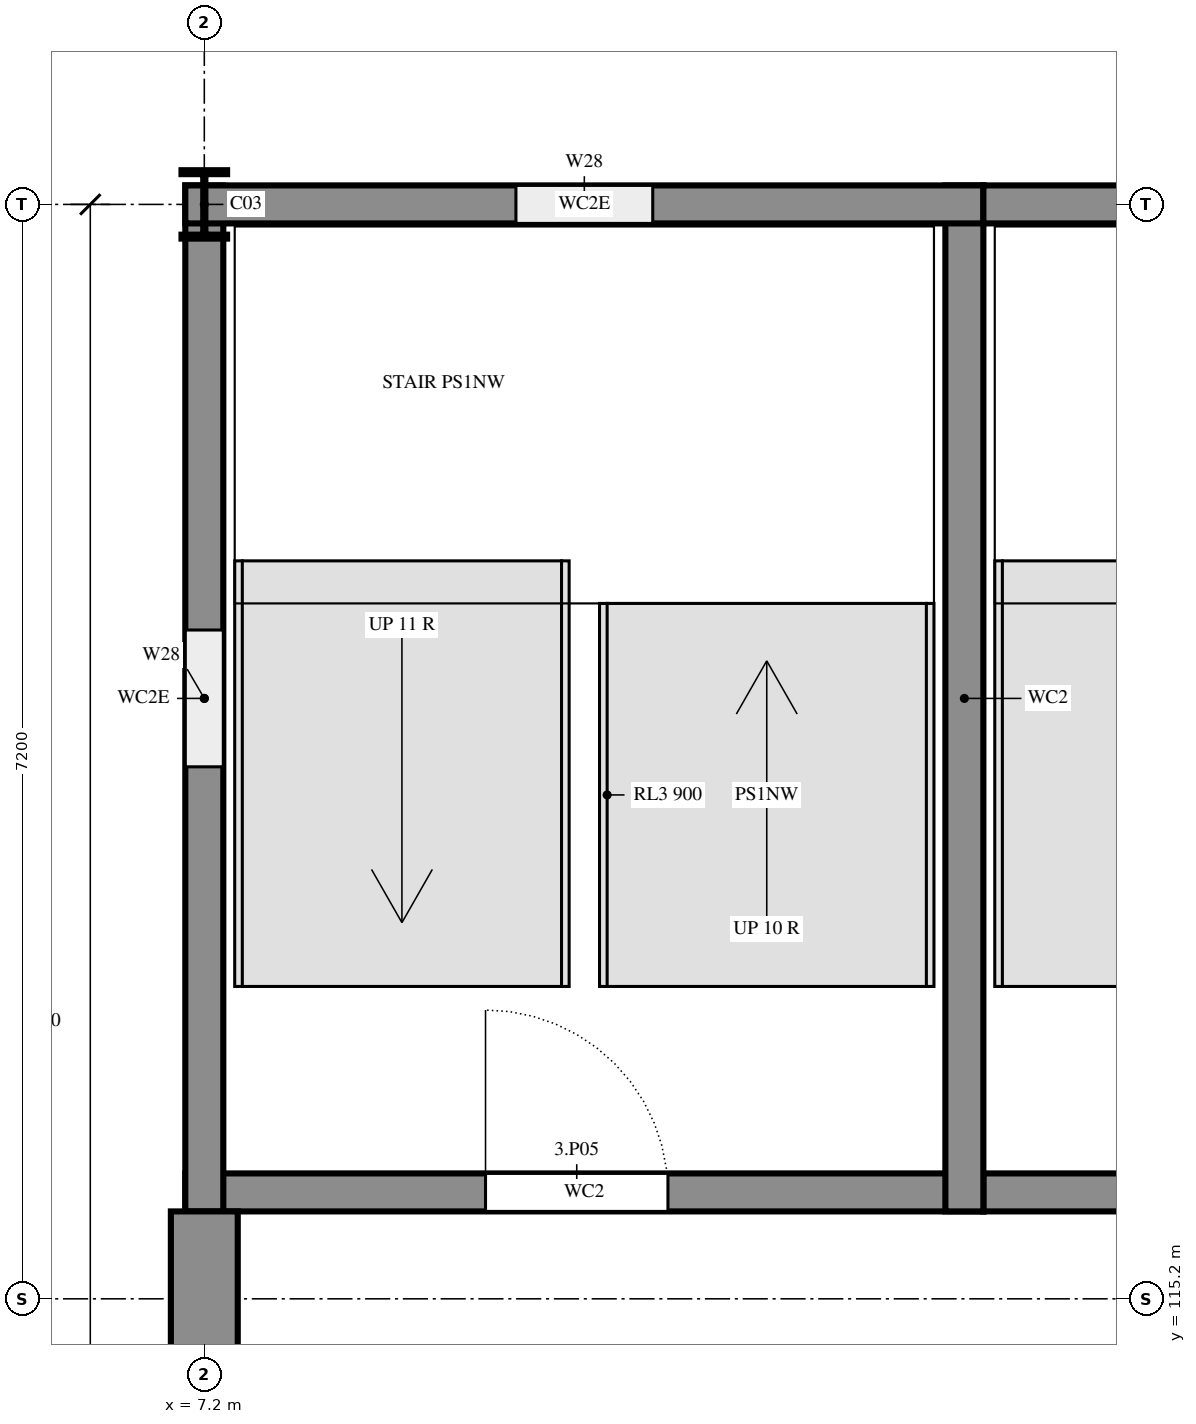
"""IFC4 building model, lengths in metres.
Left out: names, types, materials, properties, quantities, classifications, styles, units other than length and angle.
Written with IfcOpenShell. Run it as: python <this file> out.ifc"""

import sys

from ifc_helpers import new_model, si_unit, direction, frame, frame_2d, origin, origin_2d, place, context, subcontext, project, spatial, rectangle, i_section, extrude, element, fill, save


model = new_model("IFC4")
c1 = context("Model", 3, precision=1e-05, world=origin(), true_north=direction((0.0, 1.0)))
c2 = subcontext(c1, "Body", "Model", "MODEL_VIEW")
j1 = project(units=[si_unit("LENGTHUNIT", "METRE"), si_unit("PLANEANGLEUNIT", "RADIAN")], contexts=[c1])
p1 = place(None, origin())
s1 = spatial("IfcSite", under=j1, at=p1, CompositionType="ELEMENT")
p2 = place(p1, origin())
s2 = spatial("IfcBuilding", under=s1, at=p2, CompositionType="ELEMENT")
p3 = place(p2, frame((0.0, 0.0, 10.8)))
s3 = spatial("IfcBuildingStorey", under=s2, at=p3, CompositionType="ELEMENT", Elevation=10.8)
p4 = place(p3, frame((7.2, 122.4, 0.0), z_axis=(0.0, 0.0, 1.0), x_axis=(1.0, 0.0, 0.0)))
e1 = element("IfcColumn", 1, at=p4, inside=s3, PredefinedType="COLUMN", context=c2, shape_type="SweptSolid", body=[
    extrude(i_section(OverallWidth=0.3, OverallDepth=0.45, WebThickness=0.014, FlangeThickness=0.026, FilletRadius=0.027, at=origin_2d()), origin(), (0.0, 0.0, 1.0), 3.6),
])
p5 = place(p3, frame((7.075, 115.9, 0.0), z_axis=(0.0, 0.0, 1.0), x_axis=(1.0, 0.0, 0.0)))
e2 = element("IfcWall", 2, at=p5, inside=s3, PredefinedType="SHEAR", context=c2, shape_type="SweptSolid", body=[
    extrude(rectangle(XDim=5.25, YDim=0.25, at=frame_2d((2.625, 0.0))), origin(), (0.0, 0.0, 1.0), 3.6),
])
p6 = place(p5, frame((1.975, 0.0, 0.0)))
e3 = element("IfcOpeningElement", 3, at=p6, cuts=e2, PredefinedType="OPENING", context=c2, shape_type="SweptSolid", body=[
    extrude(rectangle(XDim=1.2, YDim=2.4, at=frame_2d((0.6, 1.2))), frame((0.0, 0.135, 0.0), z_axis=(0.0, -1.0, 0.0), x_axis=(1.0, 0.0, 0.0)), (0.0, 0.0, 1.0), 0.27),
])
p7 = place(p3, frame((12.325, 115.9, 0.0), z_axis=(0.0, 0.0, 1.0), x_axis=(1.0, 0.0, 0.0)))
e4 = element("IfcWall", 4, at=p7, inside=s3, PredefinedType="SHEAR", context=c2, shape_type="SweptSolid", body=[
    extrude(rectangle(XDim=5.0, YDim=0.25, at=frame_2d((2.5, 0.0))), origin(), (0.0, 0.0, 1.0), 3.6),
])
p8 = place(p7, frame((1.75, 0.0, 0.0)))
e5 = element("IfcOpeningElement", 5, at=p8, cuts=e4, PredefinedType="OPENING", context=c2, shape_type="SweptSolid", body=[
    extrude(rectangle(XDim=1.2, YDim=2.4, at=frame_2d((0.6, 1.2))), frame((0.0, 0.135, 0.0), z_axis=(0.0, -1.0, 0.0), x_axis=(1.0, 0.0, 0.0)), (0.0, 0.0, 1.0), 0.27),
])
p9 = place(p3, frame((12.2, 115.775, 0.0), z_axis=(0.0, 0.0, 1.0), x_axis=(0.0, 1.0, 0.0)))
e6 = element("IfcWall", 6, at=p9, inside=s3, PredefinedType="SHEAR", context=c2, shape_type="SweptSolid", body=[
    extrude(rectangle(XDim=6.75, YDim=0.25, at=frame_2d((3.375, 0.0))), origin(), (0.0, 0.0, 1.0), 3.6),
])
p10 = place(p3, frame((7.2, 122.525, 0.0), z_axis=(0.0, 0.0, 1.0), x_axis=(0.0, -1.0, 0.0)))
e7 = element("IfcWall", 7, at=p10, inside=s3, PredefinedType="SHEAR", context=c2, shape_type="SweptSolid", body=[
    extrude(rectangle(XDim=6.75, YDim=0.25, at=frame_2d((3.375, 0.0))), origin(), (0.0, 0.0, 1.0), 3.6),
])
p11 = place(p10, frame((2.925, 0.0, 0.6)))
e8 = element("IfcOpeningElement", 8, at=p11, cuts=e7, PredefinedType="OPENING", context=c2, shape_type="SweptSolid", body=[
    extrude(rectangle(XDim=0.9, YDim=2.1, at=frame_2d((0.45, 1.05))), frame((0.0, 0.135, 0.0), z_axis=(0.0, -1.0, 0.0), x_axis=(1.0, 0.0, 0.0)), (0.0, 0.0, 1.0), 0.27),
])
p12 = place(p3, frame((12.325, 122.4, 0.0), z_axis=(0.0, 0.0, 1.0), x_axis=(-1.0, 0.0, 0.0)))
e9 = element("IfcWall", 9, at=p12, inside=s3, PredefinedType="SHEAR", context=c2, shape_type="SweptSolid", body=[
    extrude(rectangle(XDim=5.25, YDim=0.25, at=frame_2d((2.625, 0.0))), origin(), (0.0, 0.0, 1.0), 3.6),
])
p13 = place(p12, frame((2.175, 0.0, 0.6)))
e10 = element("IfcOpeningElement", 10, at=p13, cuts=e9, PredefinedType="OPENING", context=c2, shape_type="SweptSolid", body=[
    extrude(rectangle(XDim=0.9, YDim=2.1, at=frame_2d((0.45, 1.05))), frame((0.0, 0.135, 0.0), z_axis=(0.0, -1.0, 0.0), x_axis=(1.0, 0.0, 0.0)), (0.0, 0.0, 1.0), 0.27),
])
p14 = place(p3, frame((17.325, 122.4, 0.0), z_axis=(0.0, 0.0, 1.0), x_axis=(-1.0, 0.0, 0.0)))
e11 = element("IfcWall", 11, at=p14, inside=s3, PredefinedType="SHEAR", context=c2, shape_type="SweptSolid", body=[
    extrude(rectangle(XDim=5.0, YDim=0.25, at=frame_2d((2.5, 0.0))), origin(), (0.0, 0.0, 1.0), 3.6),
])
p15 = place(p14, frame((2.175, 0.0, 0.6)))
e12 = element("IfcOpeningElement", 12, at=p15, cuts=e11, PredefinedType="OPENING", context=c2, shape_type="SweptSolid", body=[
    extrude(rectangle(XDim=0.9, YDim=2.1, at=frame_2d((0.45, 1.05))), frame((0.0, 0.135, 0.0), z_axis=(0.0, -1.0, 0.0), x_axis=(1.0, 0.0, 0.0)), (0.0, 0.0, 1.0), 0.27),
])
p16 = place(p3, frame((7.2, 115.775, 0.0), z_axis=(0.0, 0.0, 1.0), x_axis=(0.0, -1.0, 0.0)))
e13 = element("IfcWall", 13, at=p16, inside=s3, PredefinedType="SOLIDWALL", context=c2, shape_type="SweptSolid", body=[
    extrude(rectangle(XDim=4.175, YDim=0.44, at=frame_2d((2.087, 0.0))), origin(), (0.0, 0.0, 1.0), 3.42),
])
p17 = place(p13, origin())
e14 = element("IfcWindow", 14, at=p17, inside=s3, PartitioningType="SINGLE_PANEL", PredefinedType="WINDOW", context=c2, shape_type="SweptSolid", body=[
    extrude(rectangle(XDim=0.9, YDim=2.1, at=frame_2d((0.45, 1.05))), frame((0.0, 0.03, 0.0), z_axis=(0.0, -1.0, 0.0), x_axis=(1.0, 0.0, 0.0)), (0.0, 0.0, 1.0), 0.06),
])
fill(e10, e14)
p18 = place(p11, origin())
e15 = element("IfcWindow", 15, at=p18, inside=s3, PartitioningType="SINGLE_PANEL", PredefinedType="WINDOW", context=c2, shape_type="SweptSolid", body=[
    extrude(rectangle(XDim=0.9, YDim=2.1, at=frame_2d((0.45, 1.05))), frame((0.0, 0.03, 0.0), z_axis=(0.0, -1.0, 0.0), x_axis=(1.0, 0.0, 0.0)), (0.0, 0.0, 1.0), 0.06),
])
fill(e8, e15)
p19 = place(p6, origin())
e16 = element("IfcDoor", 16, at=p19, inside=s3, OperationType="SINGLE_SWING_RIGHT", PredefinedType="DOOR", context=c2, shape_type="SweptSolid", body=[
    extrude(rectangle(XDim=1.2, YDim=2.4, at=frame_2d((0.6, 1.2))), frame((0.0, 0.025, 0.0), z_axis=(0.0, -1.0, 0.0), x_axis=(1.0, 0.0, 0.0)), (0.0, 0.0, 1.0), 0.05),
])
fill(e3, e16)
save(model, sys.argv[1])
